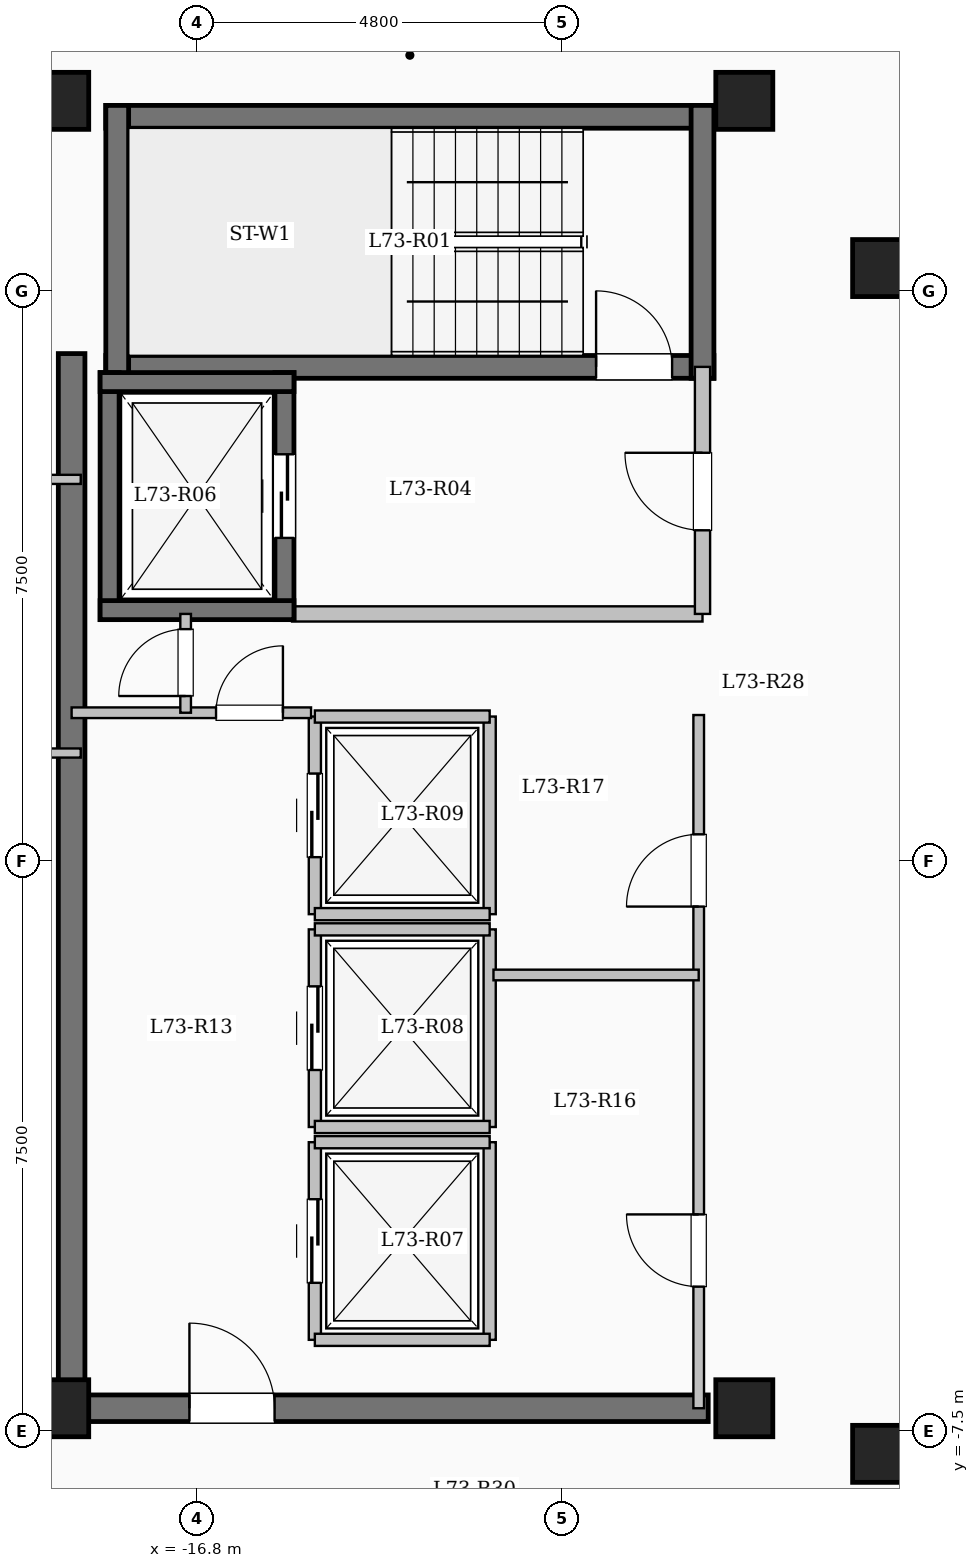
"""IFC4 building model, lengths in metres.
Left out: names, types, materials, properties, quantities, classifications, styles, units other than length and angle.
Written with IfcOpenShell. Run it as: python <this file> out.ifc"""

import sys

from ifc_helpers import new_model, si_unit, direction, frame, frame_2d, origin, origin_2d, place, context, subcontext, project, spatial, rectangle, extrude, element, fill, save


model = new_model("IFC4")
c1 = context("Model", 3, precision=1e-05, world=origin(), true_north=direction((0.0, 1.0)))
c2 = subcontext(c1, "Body", "Model", "MODEL_VIEW")
j1 = project(units=[si_unit("LENGTHUNIT", "METRE"), si_unit("PLANEANGLEUNIT", "RADIAN")], contexts=[c1])
p1 = place(None, origin())
s1 = spatial("IfcSite", under=j1, at=p1, CompositionType="ELEMENT")
p2 = place(p1, origin())
s2 = spatial("IfcBuilding", under=s1, at=p2, CompositionType="ELEMENT")
p3 = place(p2, frame((0.0, 0.0, 268.3)))
s3 = spatial("IfcBuildingStorey", under=s2, at=p3, CompositionType="ELEMENT", Elevation=268.3)
for number, where, z_axis, x_axis in (
    (1, (-7.8, -7.8, 0.0), (0.0, 0.0, 1.0), (1.0, 0.0, 0.0)),
    (2, (-7.8, 7.8, 0.0), (0.0, 0.0, 1.0), (1.0, 0.0, 0.0)),
    (3, (-9.6, -7.2, 0.0), (0.0, 0.0, 1.0), (1.0, 0.0, 0.0)),
    (4, (-9.6, 10.0, 0.0), (0.0, 0.0, 1.0), (1.0, 0.0, 0.0)),
    (5, (-18.6, -7.2, 0.0), (0.0, 0.0, 1.0), (1.0, 0.0, 0.0)),
    (6, (-18.6, 10.0, 0.0), (0.0, 0.0, 1.0), (1.0, 0.0, 0.0)),
):
    element("IfcColumn", number, at=place(p3, frame(where, z_axis=z_axis, x_axis=x_axis)), inside=s3, PredefinedType="COLUMN", context=c2, shape_type="SweptSolid", body=[
        extrude(rectangle(XDim=0.75, YDim=0.75, at=origin_2d()), origin(), (0.0, 0.0, 1.0), 3.35),
    ])
p4 = place(p3, frame((-18.0, 9.79, 0.0), z_axis=(0.0, 0.0, 1.0), x_axis=(1.0, 0.0, 0.0)))
e7 = element("IfcWall", 7, at=p4, inside=s3, PredefinedType="SHEAR", context=c2, shape_type="SweptSolid", body=[
    extrude(rectangle(XDim=8.0, YDim=0.3, at=frame_2d((4.0, 0.0))), origin(), (0.0, 0.0, 1.0), 3.35),
])
p5 = place(p3, frame((-18.0, 6.5, 0.0), z_axis=(0.0, 0.0, 1.0), x_axis=(1.0, 0.0, 0.0)))
e8 = element("IfcWall", 8, at=p5, inside=s3, PredefinedType="SHEAR", context=c2, shape_type="SweptSolid", body=[
    extrude(rectangle(XDim=8.0, YDim=0.3, at=frame_2d((4.0, 0.0))), origin(), (0.0, 0.0, 1.0), 3.35),
])
p6 = place(p5, frame((6.45, 0.0, 0.0)))
e9 = element("IfcOpeningElement", 9, at=p6, cuts=e8, PredefinedType="OPENING", context=c2, shape_type="SweptSolid", body=[
    extrude(rectangle(XDim=1.0, YDim=2.15, at=frame_2d((0.5, 1.075))), frame((0.0, 0.16, 0.0), z_axis=(0.0, -1.0, 0.0), x_axis=(1.0, 0.0, 0.0)), (0.0, 0.0, 1.0), 0.32),
])
for number, where, z_axis, x_axis in (
    (10, (-17.85, 6.35, 0.0), (0.0, 0.0, 1.0), (0.0, 1.0, 0.0)),
    (11, (-10.15, 6.35, 0.0), (0.0, 0.0, 1.0), (0.0, 1.0, 0.0)),
):
    element("IfcWall", number, at=place(p3, frame(where, z_axis=z_axis, x_axis=x_axis)), inside=s3, PredefinedType="SHEAR", context=c2, shape_type="SweptSolid", body=[
        extrude(rectangle(XDim=3.59, YDim=0.3, at=frame_2d((1.795, 0.0))), origin(), (0.0, 0.0, 1.0), 3.35),
    ])
p7 = place(p3, frame((-15.55, 3.25, 0.0), z_axis=(0.0, 0.0, 1.0), x_axis=(1.0, 0.0, 0.0)))
e12 = element("IfcWall", 12, at=p7, inside=s3, PredefinedType="SOLIDWALL", context=c2, shape_type="SweptSolid", body=[
    extrude(rectangle(XDim=5.4, YDim=0.2, at=frame_2d((2.7, 0.0))), origin(), (0.0, 0.0, 1.0), 3.05),
])
p8 = place(p3, frame((-10.15, 3.25, 0.0), z_axis=(0.0, 0.0, 1.0), x_axis=(0.0, 1.0, 0.0)))
e13 = element("IfcWall", 13, at=p8, inside=s3, PredefinedType="SOLIDWALL", context=c2, shape_type="SweptSolid", body=[
    extrude(rectangle(XDim=3.25, YDim=0.2, at=frame_2d((1.625, 0.0))), origin(), (0.0, 0.0, 1.0), 3.05),
])
p9 = place(p8, frame((1.1, 0.0, 0.0)))
e14 = element("IfcOpeningElement", 14, at=p9, cuts=e13, PredefinedType="OPENING", context=c2, shape_type="SweptSolid", body=[
    extrude(rectangle(XDim=1.02, YDim=2.15, at=frame_2d((0.51, 1.075))), frame((0.0, 0.11, 0.0), z_axis=(0.0, -1.0, 0.0), x_axis=(1.0, 0.0, 0.0)), (0.0, 0.0, 1.0), 0.22),
])
p10 = place(p3, frame((-17.95, 3.175, 0.0), z_axis=(0.0, 0.0, 1.0), x_axis=(0.0, 1.0, 0.0)))
e15 = element("IfcWall", 15, at=p10, inside=s3, PredefinedType="SHEAR", context=c2, shape_type="SweptSolid", body=[
    extrude(rectangle(XDim=3.25, YDim=0.25, at=frame_2d((1.625, 0.0))), origin(), (0.0, 0.0, 1.0), 3.35),
])
p11 = place(p3, frame((-15.65, 3.175, 0.0), z_axis=(0.0, 0.0, 1.0), x_axis=(0.0, 1.0, 0.0)))
e16 = element("IfcWall", 16, at=p11, inside=s3, PredefinedType="SHEAR", context=c2, shape_type="SweptSolid", body=[
    extrude(rectangle(XDim=3.25, YDim=0.25, at=frame_2d((1.625, 0.0))), origin(), (0.0, 0.0, 1.0), 3.35),
])
p12 = place(p11, frame((1.075, 0.0, 0.0)))
e17 = element("IfcOpeningElement", 17, at=p12, cuts=e16, PredefinedType="OPENING", context=c2, shape_type="SweptSolid", body=[
    extrude(rectangle(XDim=1.1, YDim=2.15, at=frame_2d((0.55, 1.075))), frame((0.0, 0.135, 0.0), z_axis=(0.0, -1.0, 0.0), x_axis=(1.0, 0.0, 0.0)), (0.0, 0.0, 1.0), 0.27),
])
for number, where, z_axis, x_axis in (
    (18, (-18.075, 3.3, 0.0), (0.0, 0.0, 1.0), (1.0, 0.0, 0.0)),
    (19, (-18.075, 6.3, 0.0), (0.0, 0.0, 1.0), (1.0, 0.0, 0.0)),
):
    element("IfcWall", number, at=place(p3, frame(where, z_axis=z_axis, x_axis=x_axis)), inside=s3, PredefinedType="SHEAR", context=c2, shape_type="SweptSolid", body=[
        extrude(rectangle(XDim=2.55, YDim=0.25, at=frame_2d((1.275, 0.0))), origin(), (0.0, 0.0, 1.0), 3.35),
    ])
p13 = place(p3, frame((-15.25, -6.3, 0.0), z_axis=(0.0, 0.0, 1.0), x_axis=(0.0, 1.0, 0.0)))
e20 = element("IfcWall", 20, at=p13, inside=s3, PredefinedType="SOLIDWALL", context=c2, shape_type="SweptSolid", body=[
    extrude(rectangle(XDim=2.6, YDim=0.16, at=frame_2d((1.3, 0.0))), origin(), (0.0, 0.0, 1.0), 3.05),
])
p14 = place(p13, frame((0.75, 0.0, 0.0)))
e21 = element("IfcOpeningElement", 21, at=p14, cuts=e20, PredefinedType="OPENING", context=c2, shape_type="SweptSolid", body=[
    extrude(rectangle(XDim=1.1, YDim=2.15, at=frame_2d((0.55, 1.075))), frame((0.0, 0.09, 0.0), z_axis=(0.0, -1.0, 0.0), x_axis=(1.0, 0.0, 0.0)), (0.0, 0.0, 1.0), 0.18),
])
p15 = place(p3, frame((-12.95, -6.3, 0.0), z_axis=(0.0, 0.0, 1.0), x_axis=(0.0, 1.0, 0.0)))
e22 = element("IfcWall", 22, at=p15, inside=s3, PredefinedType="SOLIDWALL", context=c2, shape_type="SweptSolid", body=[
    extrude(rectangle(XDim=2.6, YDim=0.16, at=frame_2d((1.3, 0.0))), origin(), (0.0, 0.0, 1.0), 3.05),
])
for number, where, z_axis, x_axis in (
    (23, (-15.25, -6.3, 0.0), (0.0, 0.0, 1.0), (1.0, 0.0, 0.0)),
    (24, (-15.25, -3.7, 0.0), (0.0, 0.0, 1.0), (1.0, 0.0, 0.0)),
):
    element("IfcWall", number, at=place(p3, frame(where, z_axis=z_axis, x_axis=x_axis)), inside=s3, PredefinedType="SOLIDWALL", context=c2, shape_type="SweptSolid", body=[
        extrude(rectangle(XDim=2.3, YDim=0.16, at=frame_2d((1.15, 0.0))), origin(), (0.0, 0.0, 1.0), 3.05),
    ])
p16 = place(p3, frame((-15.25, -3.5, 0.0), z_axis=(0.0, 0.0, 1.0), x_axis=(0.0, 1.0, 0.0)))
e25 = element("IfcWall", 25, at=p16, inside=s3, PredefinedType="SOLIDWALL", context=c2, shape_type="SweptSolid", body=[
    extrude(rectangle(XDim=2.6, YDim=0.16, at=frame_2d((1.3, 0.0))), origin(), (0.0, 0.0, 1.0), 3.05),
])
p17 = place(p16, frame((0.75, 0.0, 0.0)))
e26 = element("IfcOpeningElement", 26, at=p17, cuts=e25, PredefinedType="OPENING", context=c2, shape_type="SweptSolid", body=[
    extrude(rectangle(XDim=1.1, YDim=2.15, at=frame_2d((0.55, 1.075))), frame((0.0, 0.09, 0.0), z_axis=(0.0, -1.0, 0.0), x_axis=(1.0, 0.0, 0.0)), (0.0, 0.0, 1.0), 0.18),
])
p18 = place(p3, frame((-12.95, -3.5, 0.0), z_axis=(0.0, 0.0, 1.0), x_axis=(0.0, 1.0, 0.0)))
e27 = element("IfcWall", 27, at=p18, inside=s3, PredefinedType="SOLIDWALL", context=c2, shape_type="SweptSolid", body=[
    extrude(rectangle(XDim=2.6, YDim=0.16, at=frame_2d((1.3, 0.0))), origin(), (0.0, 0.0, 1.0), 3.05),
])
for number, where, z_axis, x_axis in (
    (28, (-15.25, -3.5, 0.0), (0.0, 0.0, 1.0), (1.0, 0.0, 0.0)),
    (29, (-15.25, -0.9, 0.0), (0.0, 0.0, 1.0), (1.0, 0.0, 0.0)),
):
    element("IfcWall", number, at=place(p3, frame(where, z_axis=z_axis, x_axis=x_axis)), inside=s3, PredefinedType="SOLIDWALL", context=c2, shape_type="SweptSolid", body=[
        extrude(rectangle(XDim=2.3, YDim=0.16, at=frame_2d((1.15, 0.0))), origin(), (0.0, 0.0, 1.0), 3.05),
    ])
p19 = place(p3, frame((-15.25, -0.7, 0.0), z_axis=(0.0, 0.0, 1.0), x_axis=(0.0, 1.0, 0.0)))
e30 = element("IfcWall", 30, at=p19, inside=s3, PredefinedType="SOLIDWALL", context=c2, shape_type="SweptSolid", body=[
    extrude(rectangle(XDim=2.6, YDim=0.16, at=frame_2d((1.3, 0.0))), origin(), (0.0, 0.0, 1.0), 3.05),
])
p20 = place(p19, frame((0.75, 0.0, 0.0)))
e31 = element("IfcOpeningElement", 31, at=p20, cuts=e30, PredefinedType="OPENING", context=c2, shape_type="SweptSolid", body=[
    extrude(rectangle(XDim=1.1, YDim=2.15, at=frame_2d((0.55, 1.075))), frame((0.0, 0.09, 0.0), z_axis=(0.0, -1.0, 0.0), x_axis=(1.0, 0.0, 0.0)), (0.0, 0.0, 1.0), 0.18),
])
p21 = place(p3, frame((-12.95, -0.7, 0.0), z_axis=(0.0, 0.0, 1.0), x_axis=(0.0, 1.0, 0.0)))
e32 = element("IfcWall", 32, at=p21, inside=s3, PredefinedType="SOLIDWALL", context=c2, shape_type="SweptSolid", body=[
    extrude(rectangle(XDim=2.6, YDim=0.16, at=frame_2d((1.3, 0.0))), origin(), (0.0, 0.0, 1.0), 3.05),
])
for number, where, z_axis, x_axis in (
    (33, (-15.25, -0.7, 0.0), (0.0, 0.0, 1.0), (1.0, 0.0, 0.0)),
    (34, (-15.25, 1.9, 0.0), (0.0, 0.0, 1.0), (1.0, 0.0, 0.0)),
):
    element("IfcWall", number, at=place(p3, frame(where, z_axis=z_axis, x_axis=x_axis)), inside=s3, PredefinedType="SOLIDWALL", context=c2, shape_type="SweptSolid", body=[
        extrude(rectangle(XDim=2.3, YDim=0.16, at=frame_2d((1.15, 0.0))), origin(), (0.0, 0.0, 1.0), 3.05),
    ])
p22 = place(p3, frame((-18.45, -7.375, 0.0), z_axis=(0.0, 0.0, 1.0), x_axis=(0.0, 1.0, 0.0)))
e35 = element("IfcWall", 35, at=p22, inside=s3, PredefinedType="SHEAR", context=c2, shape_type="SweptSolid", body=[
    extrude(rectangle(XDim=14.05, YDim=0.35, at=frame_2d((7.025, 0.0))), origin(), (0.0, 0.0, 1.0), 3.35),
])
p23 = place(p3, frame((-18.625, -7.2, 0.0), z_axis=(0.0, 0.0, 1.0), x_axis=(1.0, 0.0, 0.0)))
e36 = element("IfcWall", 36, at=p23, inside=s3, PredefinedType="SHEAR", context=c2, shape_type="SweptSolid", body=[
    extrude(rectangle(XDim=8.55, YDim=0.35, at=frame_2d((4.275, 0.0))), origin(), (0.0, 0.0, 1.0), 3.35),
])
p24 = place(p23, frame((1.725, 0.0, 0.0)))
e37 = element("IfcOpeningElement", 37, at=p24, cuts=e36, PredefinedType="OPENING", context=c2, shape_type="SweptSolid", body=[
    extrude(rectangle(XDim=1.12, YDim=2.15, at=frame_2d((0.56, 1.075))), frame((0.0, 0.185, 0.0), z_axis=(0.0, -1.0, 0.0), x_axis=(1.0, 0.0, 0.0)), (0.0, 0.0, 1.0), 0.37),
])
p25 = place(p3, frame((-18.45, 1.95, 0.0), z_axis=(0.0, 0.0, 1.0), x_axis=(1.0, 0.0, 0.0)))
e38 = element("IfcWall", 38, at=p25, inside=s3, PredefinedType="PARTITIONING", context=c2, shape_type="SweptSolid", body=[
    extrude(rectangle(XDim=3.15, YDim=0.14, at=frame_2d((1.575, 0.0))), origin(), (0.0, 0.0, 1.0), 3.05),
])
p26 = place(p25, frame((1.9, 0.0, 0.0)))
e39 = element("IfcOpeningElement", 39, at=p26, cuts=e38, PredefinedType="OPENING", context=c2, shape_type="SweptSolid", body=[
    extrude(rectangle(XDim=0.88, YDim=2.1, at=frame_2d((0.44, 1.05))), frame((0.0, 0.08, 0.0), z_axis=(0.0, -1.0, 0.0), x_axis=(1.0, 0.0, 0.0)), (0.0, 0.0, 1.0), 0.16),
])
p27 = place(p3, frame((-16.95, 1.95, 0.0), z_axis=(0.0, 0.0, 1.0), x_axis=(0.0, 1.0, 0.0)))
e40 = element("IfcWall", 40, at=p27, inside=s3, PredefinedType="PARTITIONING", context=c2, shape_type="SweptSolid", body=[
    extrude(rectangle(XDim=1.3, YDim=0.14, at=frame_2d((0.65, 0.0))), origin(), (0.0, 0.0, 1.0), 3.05),
])
p28 = place(p27, frame((0.22, 0.0, 0.0)))
e41 = element("IfcOpeningElement", 41, at=p28, cuts=e40, PredefinedType="OPENING", context=c2, shape_type="SweptSolid", body=[
    extrude(rectangle(XDim=0.88, YDim=2.1, at=frame_2d((0.44, 1.05))), frame((0.0, 0.08, 0.0), z_axis=(0.0, -1.0, 0.0), x_axis=(1.0, 0.0, 0.0)), (0.0, 0.0, 1.0), 0.16),
])
p29 = place(p3, frame((-10.2, -7.2, 0.0), z_axis=(0.0, 0.0, 1.0), x_axis=(0.0, 1.0, 0.0)))
e42 = element("IfcWall", 42, at=p29, inside=s3, PredefinedType="PARTITIONING", context=c2, shape_type="SweptSolid", body=[
    extrude(rectangle(XDim=9.12, YDim=0.14, at=frame_2d((4.56, 0.0))), origin(), (0.0, 0.0, 1.0), 3.05),
])
p30 = place(p29, frame((1.6, 0.0, 0.0)))
e43 = element("IfcOpeningElement", 43, at=p30, cuts=e42, PredefinedType="OPENING", context=c2, shape_type="SweptSolid", body=[
    extrude(rectangle(XDim=0.95, YDim=2.12, at=frame_2d((0.475, 1.06))), frame((0.0, 0.08, 0.0), z_axis=(0.0, -1.0, 0.0), x_axis=(1.0, 0.0, 0.0)), (0.0, 0.0, 1.0), 0.16),
])
p31 = place(p29, frame((6.6, 0.0, 0.0)))
e44 = element("IfcOpeningElement", 44, at=p31, cuts=e42, PredefinedType="OPENING", context=c2, shape_type="SweptSolid", body=[
    extrude(rectangle(XDim=0.95, YDim=2.12, at=frame_2d((0.475, 1.06))), frame((0.0, 0.08, 0.0), z_axis=(0.0, -1.0, 0.0), x_axis=(1.0, 0.0, 0.0)), (0.0, 0.0, 1.0), 0.16),
])
p32 = place(p3, frame((-12.9, -1.5, 0.0), z_axis=(0.0, 0.0, 1.0), x_axis=(1.0, 0.0, 0.0)))
e45 = element("IfcWall", 45, at=p32, inside=s3, PredefinedType="PARTITIONING", context=c2, shape_type="SweptSolid", body=[
    extrude(rectangle(XDim=2.7, YDim=0.14, at=frame_2d((1.35, 0.0))), origin(), (0.0, 0.0, 1.0), 3.05),
])
p33 = place(p3, frame((-22.68, -7.25, 0.0), z_axis=(0.0, 0.0, 1.0), x_axis=(1.0, 0.0, 0.0)))
e46 = element("IfcWall", 46, at=p33, inside=s3, PredefinedType="PARTITIONING", context=c2, shape_type="SweptSolid", body=[
    extrude(rectangle(XDim=4.23, YDim=0.15, at=frame_2d((2.115, 0.0))), origin(), (0.0, 0.0, 1.0), 3.05),
])
p34 = place(p33, frame((1.73, 0.0, 0.0)))
e47 = element("IfcOpeningElement", 47, at=p34, cuts=e46, PredefinedType="OPENING", context=c2, shape_type="SweptSolid", body=[
    extrude(rectangle(XDim=0.96, YDim=2.15, at=frame_2d((0.48, 1.075))), frame((0.0, 0.085, 0.0), z_axis=(0.0, -1.0, 0.0), x_axis=(1.0, 0.0, 0.0)), (0.0, 0.0, 1.0), 0.17),
])
p35 = place(p3, frame((-22.8, 1.42, 0.0), z_axis=(0.0, 0.0, 1.0), x_axis=(1.0, 0.0, 0.0)))
e48 = element("IfcWall", 48, at=p35, inside=s3, PredefinedType="PARTITIONING", context=c2, shape_type="SweptSolid", body=[
    extrude(rectangle(XDim=4.47, YDim=0.12, at=frame_2d((2.235, 0.0))), origin(), (0.0, 0.0, 1.0), 3.05),
])
p36 = place(p35, frame((0.713, 0.0, 0.0)))
e49 = element("IfcOpeningElement", 49, at=p36, cuts=e48, PredefinedType="OPENING", context=c2, shape_type="SweptSolid", body=[
    extrude(rectangle(XDim=0.88, YDim=2.1, at=frame_2d((0.44, 1.05))), frame((0.0, 0.07, 0.0), z_axis=(0.0, -1.0, 0.0), x_axis=(1.0, 0.0, 0.0)), (0.0, 0.0, 1.0), 0.14),
])
p37 = place(p35, frame((2.778, 0.0, 0.0)))
e50 = element("IfcOpeningElement", 50, at=p37, cuts=e48, PredefinedType="OPENING", context=c2, shape_type="SweptSolid", body=[
    extrude(rectangle(XDim=0.88, YDim=2.1, at=frame_2d((0.44, 1.05))), frame((0.0, 0.07, 0.0), z_axis=(0.0, -1.0, 0.0), x_axis=(1.0, 0.0, 0.0)), (0.0, 0.0, 1.0), 0.14),
])
p38 = place(p3, frame((-22.8, 5.02, 0.0), z_axis=(0.0, 0.0, 1.0), x_axis=(1.0, 0.0, 0.0)))
e51 = element("IfcWall", 51, at=p38, inside=s3, PredefinedType="PARTITIONING", context=c2, shape_type="SweptSolid", body=[
    extrude(rectangle(XDim=4.47, YDim=0.12, at=frame_2d((2.235, 0.0))), origin(), (0.0, 0.0, 1.0), 3.05),
])
p39 = place(p38, frame((2.9, 0.0, 0.0)))
e52 = element("IfcOpeningElement", 52, at=p39, cuts=e51, PredefinedType="OPENING", context=c2, shape_type="SweptSolid", body=[
    extrude(rectangle(XDim=0.88, YDim=2.1, at=frame_2d((0.44, 1.05))), frame((0.0, 0.07, 0.0), z_axis=(0.0, -1.0, 0.0), x_axis=(1.0, 0.0, 0.0)), (0.0, 0.0, 1.0), 0.14),
])
p40 = place(p6, origin())
e53 = element("IfcDoor", 53, at=p40, inside=s3, OperationType="SINGLE_SWING_LEFT", PredefinedType="DOOR", context=c2, shape_type="SweptSolid", body=[
    extrude(rectangle(XDim=1.0, YDim=2.15, at=frame_2d((0.5, 1.075))), frame((0.0, 0.025, 0.0), z_axis=(0.0, -1.0, 0.0), x_axis=(1.0, 0.0, 0.0)), (0.0, 0.0, 1.0), 0.05),
])
fill(e9, e53)
p41 = place(p9, origin())
e54 = element("IfcDoor", 54, at=p41, inside=s3, OperationType="SINGLE_SWING_RIGHT", PredefinedType="DOOR", context=c2, shape_type="SweptSolid", body=[
    extrude(rectangle(XDim=1.02, YDim=2.15, at=frame_2d((0.51, 1.075))), frame((0.0, 0.025, 0.0), z_axis=(0.0, -1.0, 0.0), x_axis=(1.0, 0.0, 0.0)), (0.0, 0.0, 1.0), 0.05),
])
fill(e14, e54)
p42 = place(p12, origin())
e55 = element("IfcDoor", 55, at=p42, inside=s3, OperationType="SLIDING_TO_LEFT", PredefinedType="DOOR", context=c2, shape_type="SweptSolid", body=[
    extrude(rectangle(XDim=1.1, YDim=2.15, at=frame_2d((0.55, 1.075))), frame((0.0, 0.025, 0.0), z_axis=(0.0, -1.0, 0.0), x_axis=(1.0, 0.0, 0.0)), (0.0, 0.0, 1.0), 0.05),
])
fill(e17, e55)
p43 = place(p14, origin())
e56 = element("IfcDoor", 56, at=p43, inside=s3, OperationType="SLIDING_TO_LEFT", PredefinedType="DOOR", context=c2, shape_type="SweptSolid", body=[
    extrude(rectangle(XDim=1.1, YDim=2.15, at=frame_2d((0.55, 1.075))), frame((0.0, 0.025, 0.0), z_axis=(0.0, -1.0, 0.0), x_axis=(1.0, 0.0, 0.0)), (0.0, 0.0, 1.0), 0.05),
])
fill(e21, e56)
p44 = place(p17, origin())
e57 = element("IfcDoor", 57, at=p44, inside=s3, OperationType="SLIDING_TO_LEFT", PredefinedType="DOOR", context=c2, shape_type="SweptSolid", body=[
    extrude(rectangle(XDim=1.1, YDim=2.15, at=frame_2d((0.55, 1.075))), frame((0.0, 0.025, 0.0), z_axis=(0.0, -1.0, 0.0), x_axis=(1.0, 0.0, 0.0)), (0.0, 0.0, 1.0), 0.05),
])
fill(e26, e57)
p45 = place(p20, origin())
e58 = element("IfcDoor", 58, at=p45, inside=s3, OperationType="SLIDING_TO_LEFT", PredefinedType="DOOR", context=c2, shape_type="SweptSolid", body=[
    extrude(rectangle(XDim=1.1, YDim=2.15, at=frame_2d((0.55, 1.075))), frame((0.0, 0.025, 0.0), z_axis=(0.0, -1.0, 0.0), x_axis=(1.0, 0.0, 0.0)), (0.0, 0.0, 1.0), 0.05),
])
fill(e31, e58)
p46 = place(p24, origin())
e59 = element("IfcDoor", 59, at=p46, inside=s3, OperationType="SINGLE_SWING_LEFT", PredefinedType="DOOR", context=c2, shape_type="SweptSolid", body=[
    extrude(rectangle(XDim=1.12, YDim=2.15, at=frame_2d((0.56, 1.075))), frame((0.0, 0.025, 0.0), z_axis=(0.0, -1.0, 0.0), x_axis=(1.0, 0.0, 0.0)), (0.0, 0.0, 1.0), 0.05),
])
fill(e37, e59)
p47 = place(p26, origin())
e60 = element("IfcDoor", 60, at=p47, inside=s3, OperationType="SINGLE_SWING_RIGHT", PredefinedType="DOOR", context=c2, shape_type="SweptSolid", body=[
    extrude(rectangle(XDim=0.88, YDim=2.1, at=frame_2d((0.44, 1.05))), frame((0.0, 0.025, 0.0), z_axis=(0.0, -1.0, 0.0), x_axis=(1.0, 0.0, 0.0)), (0.0, 0.0, 1.0), 0.05),
])
fill(e39, e60)
p48 = place(p28, origin())
e61 = element("IfcDoor", 61, at=p48, inside=s3, OperationType="SINGLE_SWING_LEFT", PredefinedType="DOOR", context=c2, shape_type="SweptSolid", body=[
    extrude(rectangle(XDim=0.88, YDim=2.1, at=frame_2d((0.44, 1.05))), frame((0.0, 0.025, 0.0), z_axis=(0.0, -1.0, 0.0), x_axis=(1.0, 0.0, 0.0)), (0.0, 0.0, 1.0), 0.05),
])
fill(e41, e61)
p49 = place(p30, origin())
e62 = element("IfcDoor", 62, at=p49, inside=s3, OperationType="SINGLE_SWING_RIGHT", PredefinedType="DOOR", context=c2, shape_type="SweptSolid", body=[
    extrude(rectangle(XDim=0.95, YDim=2.12, at=frame_2d((0.475, 1.06))), frame((0.0, 0.025, 0.0), z_axis=(0.0, -1.0, 0.0), x_axis=(1.0, 0.0, 0.0)), (0.0, 0.0, 1.0), 0.05),
])
fill(e43, e62)
p50 = place(p31, origin())
e63 = element("IfcDoor", 63, at=p50, inside=s3, OperationType="SINGLE_SWING_LEFT", PredefinedType="DOOR", context=c2, shape_type="SweptSolid", body=[
    extrude(rectangle(XDim=0.95, YDim=2.12, at=frame_2d((0.475, 1.06))), frame((0.0, 0.025, 0.0), z_axis=(0.0, -1.0, 0.0), x_axis=(1.0, 0.0, 0.0)), (0.0, 0.0, 1.0), 0.05),
])
fill(e44, e63)
save(model, sys.argv[1])
